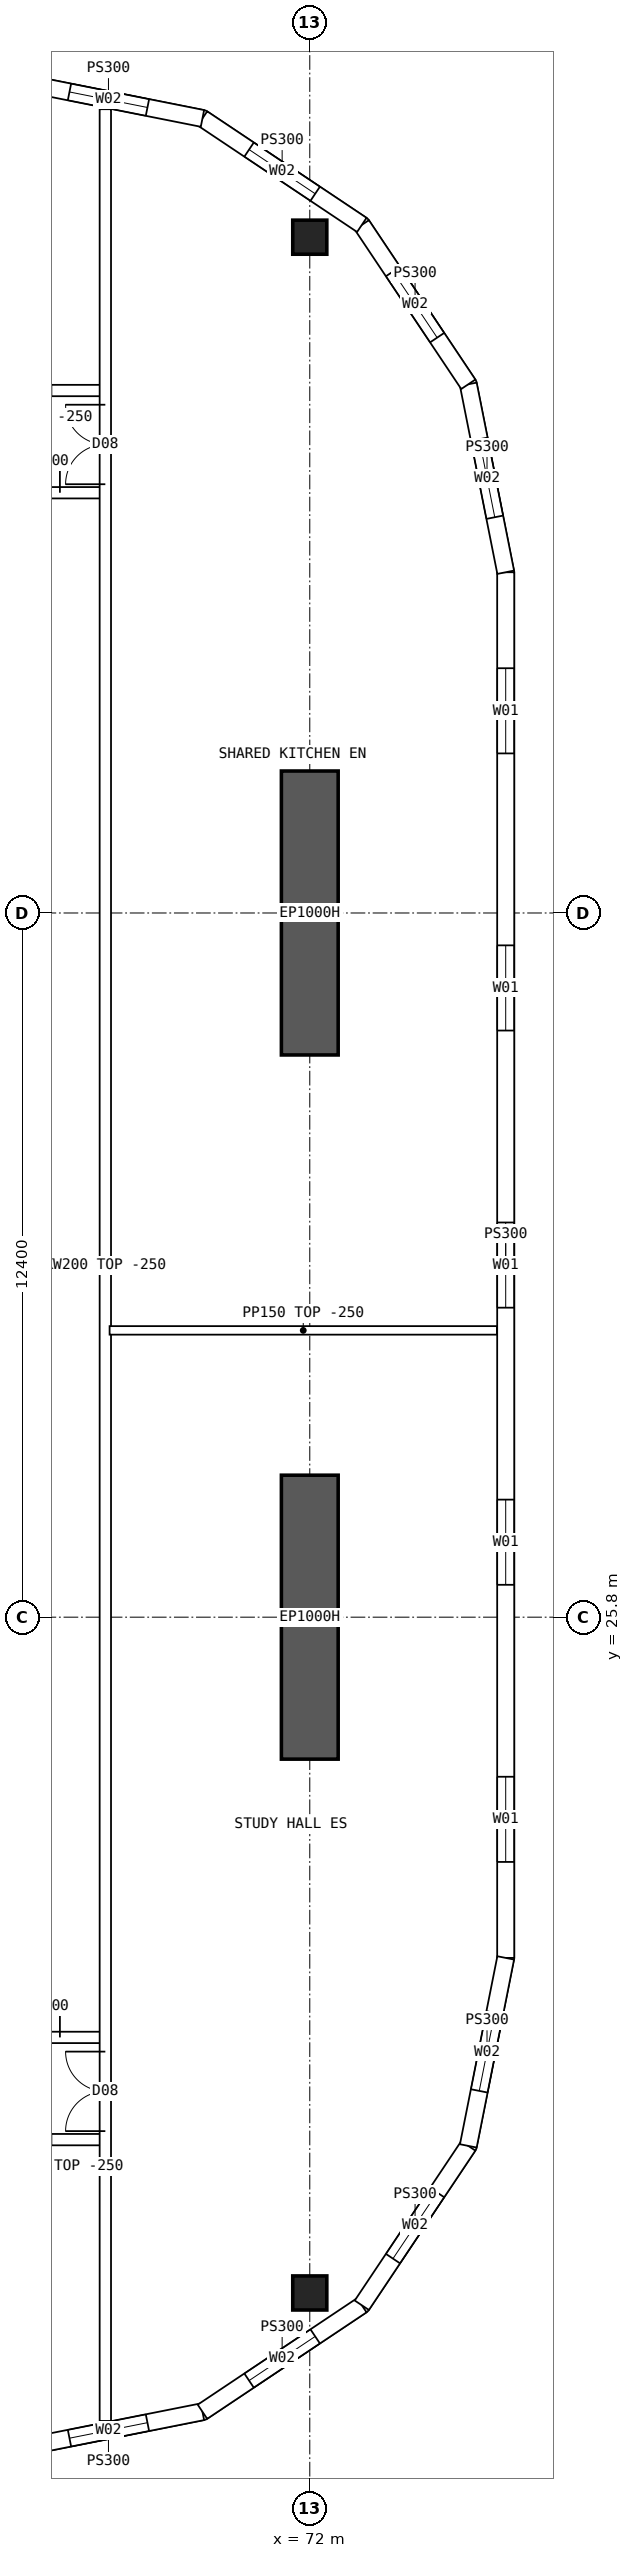
"""IFC4 building model, lengths in metres.
Left out: names, types, materials, properties, quantities, classifications, styles, units other than length and angle.
Written with IfcOpenShell. Run it as: python <this file> out.ifc"""

import sys

from ifc_helpers import new_model, si_unit, direction, frame, frame_2d, origin, origin_2d, place, context, subcontext, project, spatial, polyline, rectangle, hollow_rectangle, outline, extrude, element, fill, save


model = new_model("IFC4")
c1 = context("Model", 3, precision=1e-05, world=origin(), true_north=direction((0.0, 1.0)))
c2 = subcontext(c1, "Body", "Model", "MODEL_VIEW")
j1 = project(units=[si_unit("LENGTHUNIT", "METRE"), si_unit("PLANEANGLEUNIT", "RADIAN")], contexts=[c1])
p1 = place(None, origin())
s1 = spatial("IfcSite", under=j1, at=p1, CompositionType="ELEMENT")
p2 = place(p1, origin())
s2 = spatial("IfcBuilding", under=s1, at=p2, CompositionType="ELEMENT")
p3 = place(p2, frame((0.0, 0.0, 250.3)))
s3 = spatial("IfcBuildingStorey", under=s2, at=p3, CompositionType="ELEMENT", Elevation=250.3)
for number, where, z_axis, x_axis in (
    (1, (72.0, 13.9, 0.0), (0.0, 0.0, 1.0), (1.0, 0.0, 0.0)),
    (2, (72.0, 50.1, 0.0), (0.0, 0.0, 1.0), (1.0, 0.0, 0.0)),
):
    element("IfcColumn", number, at=place(p3, frame(where, z_axis=z_axis, x_axis=x_axis)), inside=s3, PredefinedType="COLUMN", context=c2, shape_type="SweptSolid", body=[
        extrude(hollow_rectangle(XDim=0.6, YDim=0.6, WallThickness=0.06, at=origin_2d()), origin(), (0.0, 0.0, 1.0), 3.75),
    ])
for number, where, z_axis, x_axis in (
    (3, (72.0, 23.3, 0.0), (0.0, 0.0, 1.0), (0.0, 1.0, 0.0)),
    (4, (72.0, 35.7, 0.0), (0.0, 0.0, 1.0), (0.0, 1.0, 0.0)),
):
    element("IfcWall", number, at=place(p3, frame(where, z_axis=z_axis, x_axis=x_axis)), inside=s3, PredefinedType="SHEAR", context=c2, shape_type="SweptSolid", body=[
        extrude(rectangle(XDim=5.0, YDim=1.0, at=frame_2d((2.5, 0.0))), origin(), (0.0, 0.0, 1.0), 3.75),
    ])
p4 = place(p3, frame((75.45, 19.8, 0.0), z_axis=(0.0, 0.0, 1.0), x_axis=(0.0, 1.0, 0.0)))
e5 = element("IfcWall", 5, at=p4, inside=s3, PredefinedType="SOLIDWALL", context=c2, shape_type="SweptSolid", body=[
    extrude(outline(polyline([(-0.015, -0.15), (24.415, -0.15), (24.385, 0.15), (0.015, 0.15), (-0.015, -0.15)])), origin(), (0.0, 0.0, 1.0), 3.5),
])
p5 = place(p4, frame((1.69, 0.0, 0.9)))
e6 = element("IfcOpeningElement", 6, at=p5, cuts=e5, PredefinedType="OPENING", context=c2, shape_type="SweptSolid", body=[
    extrude(rectangle(XDim=1.5, YDim=2.0, at=frame_2d((0.75, 1.0))), frame((0.0, 0.16, 0.0), z_axis=(0.0, -1.0, 0.0), x_axis=(1.0, 0.0, 0.0)), (0.0, 0.0, 1.0), 0.32),
])
p6 = place(p4, frame((6.57, 0.0, 0.9)))
e7 = element("IfcOpeningElement", 7, at=p6, cuts=e5, PredefinedType="OPENING", context=c2, shape_type="SweptSolid", body=[
    extrude(rectangle(XDim=1.5, YDim=2.0, at=frame_2d((0.75, 1.0))), frame((0.0, 0.16, 0.0), z_axis=(0.0, -1.0, 0.0), x_axis=(1.0, 0.0, 0.0)), (0.0, 0.0, 1.0), 0.32),
])
p7 = place(p4, frame((11.45, 0.0, 0.9)))
e8 = element("IfcOpeningElement", 8, at=p7, cuts=e5, PredefinedType="OPENING", context=c2, shape_type="SweptSolid", body=[
    extrude(rectangle(XDim=1.5, YDim=2.0, at=frame_2d((0.75, 1.0))), frame((0.0, 0.16, 0.0), z_axis=(0.0, -1.0, 0.0), x_axis=(1.0, 0.0, 0.0)), (0.0, 0.0, 1.0), 0.32),
])
p8 = place(p4, frame((16.33, 0.0, 0.9)))
e9 = element("IfcOpeningElement", 9, at=p8, cuts=e5, PredefinedType="OPENING", context=c2, shape_type="SweptSolid", body=[
    extrude(rectangle(XDim=1.5, YDim=2.0, at=frame_2d((0.75, 1.0))), frame((0.0, 0.16, 0.0), z_axis=(0.0, -1.0, 0.0), x_axis=(1.0, 0.0, 0.0)), (0.0, 0.0, 1.0), 0.32),
])
p9 = place(p4, frame((21.21, 0.0, 0.9)))
e10 = element("IfcOpeningElement", 10, at=p9, cuts=e5, PredefinedType="OPENING", context=c2, shape_type="SweptSolid", body=[
    extrude(rectangle(XDim=1.5, YDim=2.0, at=frame_2d((0.75, 1.0))), frame((0.0, 0.16, 0.0), z_axis=(0.0, -1.0, 0.0), x_axis=(1.0, 0.0, 0.0)), (0.0, 0.0, 1.0), 0.32),
])
p10 = place(p3, frame((66.8, 11.15, 0.0), z_axis=(0.0, 0.0, 1.0), x_axis=(0.98078325777, 0.195100490205, 0.0)))
e11 = element("IfcWall", 11, at=p10, inside=s3, PredefinedType="SOLIDWALL", context=c2, shape_type="SweptSolid", body=[
    extrude(outline(polyline([(-0.03, -0.15), (3.405, -0.15), (3.345, 0.15), (0.03, 0.15), (-0.03, -0.15)])), origin(), (0.0, 0.0, 1.0), 3.5),
])
p11 = place(p10, frame((0.988, 0.0, 0.9)))
e12 = element("IfcOpeningElement", 12, at=p11, cuts=e11, PredefinedType="OPENING", context=c2, shape_type="SweptSolid", body=[
    extrude(rectangle(XDim=1.4, YDim=1.8, at=frame_2d((0.7, 0.9))), frame((0.0, 0.16, 0.0), z_axis=(0.0, -1.0, 0.0), x_axis=(1.0, 0.0, 0.0)), (0.0, 0.0, 1.0), 0.32),
])
p12 = place(p3, frame((70.11, 11.808, 0.0), z_axis=(0.0, 0.0, 1.0), x_axis=(0.831460037396, 0.555584562613, 0.0)))
e13 = element("IfcWall", 13, at=p12, inside=s3, PredefinedType="SOLIDWALL", context=c2, shape_type="SweptSolid", body=[
    extrude(outline(polyline([(-0.03, -0.15), (3.405, -0.15), (3.345, 0.15), (0.03, 0.15), (-0.03, -0.15)])), origin(), (0.0, 0.0, 1.0), 3.5),
])
p13 = place(p12, frame((0.988, 0.0, 0.9)))
e14 = element("IfcOpeningElement", 14, at=p13, cuts=e13, PredefinedType="OPENING", context=c2, shape_type="SweptSolid", body=[
    extrude(rectangle(XDim=1.4, YDim=1.8, at=frame_2d((0.7, 0.9))), frame((0.0, 0.16, 0.0), z_axis=(0.0, -1.0, 0.0), x_axis=(1.0, 0.0, 0.0)), (0.0, 0.0, 1.0), 0.32),
])
p14 = place(p3, frame((72.917, 13.684, 0.0), z_axis=(0.0, 0.0, 1.0), x_axis=(0.555567969291, 0.831471124873, 0.0)))
e15 = element("IfcWall", 15, at=p14, inside=s3, PredefinedType="SOLIDWALL", context=c2, shape_type="SweptSolid", body=[
    extrude(outline(polyline([(-0.03, -0.15), (3.405, -0.15), (3.345, 0.15), (0.03, 0.15), (-0.03, -0.15)])), origin(), (0.0, 0.0, 1.0), 3.5),
])
p15 = place(p14, frame((0.988, 0.0, 0.9)))
e16 = element("IfcOpeningElement", 16, at=p15, cuts=e15, PredefinedType="OPENING", context=c2, shape_type="SweptSolid", body=[
    extrude(rectangle(XDim=1.4, YDim=1.8, at=frame_2d((0.7, 0.9))), frame((0.0, 0.16, 0.0), z_axis=(0.0, -1.0, 0.0), x_axis=(1.0, 0.0, 0.0)), (0.0, 0.0, 1.0), 0.32),
])
p16 = place(p3, frame((74.792, 16.49, 0.0), z_axis=(0.0, 0.0, 1.0), x_axis=(0.19508664885, 0.980786011034, 0.0)))
e17 = element("IfcWall", 17, at=p16, inside=s3, PredefinedType="SOLIDWALL", context=c2, shape_type="SweptSolid", body=[
    extrude(outline(polyline([(-0.03, -0.15), (3.39, -0.15), (3.36, 0.15), (0.03, 0.15), (-0.03, -0.15)])), origin(), (0.0, 0.0, 1.0), 3.5),
])
p17 = place(p16, frame((0.988, 0.0, 0.9)))
e18 = element("IfcOpeningElement", 18, at=p17, cuts=e17, PredefinedType="OPENING", context=c2, shape_type="SweptSolid", body=[
    extrude(rectangle(XDim=1.4, YDim=1.8, at=frame_2d((0.7, 0.9))), frame((0.0, 0.16, 0.0), z_axis=(0.0, -1.0, 0.0), x_axis=(1.0, 0.0, 0.0)), (0.0, 0.0, 1.0), 0.32),
])
p18 = place(p3, frame((75.45, 44.2, 0.0), z_axis=(0.0, 0.0, 1.0), x_axis=(-0.19508664885, 0.980786011034, 0.0)))
e19 = element("IfcWall", 19, at=p18, inside=s3, PredefinedType="SOLIDWALL", context=c2, shape_type="SweptSolid", body=[
    extrude(outline(polyline([(-0.015, -0.15), (3.405, -0.15), (3.345, 0.15), (0.015, 0.15), (-0.015, -0.15)])), origin(), (0.0, 0.0, 1.0), 3.5),
])
p19 = place(p18, frame((0.988, 0.0, 0.9)))
e20 = element("IfcOpeningElement", 20, at=p19, cuts=e19, PredefinedType="OPENING", context=c2, shape_type="SweptSolid", body=[
    extrude(rectangle(XDim=1.4, YDim=1.8, at=frame_2d((0.7, 0.9))), frame((0.0, 0.16, 0.0), z_axis=(0.0, -1.0, 0.0), x_axis=(1.0, 0.0, 0.0)), (0.0, 0.0, 1.0), 0.32),
])
p20 = place(p3, frame((74.792, 47.51, 0.0), z_axis=(0.0, 0.0, 1.0), x_axis=(-0.555567969291, 0.831471124873, 0.0)))
e21 = element("IfcWall", 21, at=p20, inside=s3, PredefinedType="SOLIDWALL", context=c2, shape_type="SweptSolid", body=[
    extrude(outline(polyline([(-0.03, -0.15), (3.405, -0.15), (3.345, 0.15), (0.03, 0.15), (-0.03, -0.15)])), origin(), (0.0, 0.0, 1.0), 3.5),
])
p21 = place(p20, frame((0.988, 0.0, 0.9)))
e22 = element("IfcOpeningElement", 22, at=p21, cuts=e21, PredefinedType="OPENING", context=c2, shape_type="SweptSolid", body=[
    extrude(rectangle(XDim=1.4, YDim=1.8, at=frame_2d((0.7, 0.9))), frame((0.0, 0.16, 0.0), z_axis=(0.0, -1.0, 0.0), x_axis=(1.0, 0.0, 0.0)), (0.0, 0.0, 1.0), 0.32),
])
p22 = place(p3, frame((72.917, 50.316, 0.0), z_axis=(0.0, 0.0, 1.0), x_axis=(-0.831460037396, 0.555584562613, 0.0)))
e23 = element("IfcWall", 23, at=p22, inside=s3, PredefinedType="SOLIDWALL", context=c2, shape_type="SweptSolid", body=[
    extrude(outline(polyline([(-0.03, -0.15), (3.405, -0.15), (3.345, 0.15), (0.03, 0.15), (-0.03, -0.15)])), origin(), (0.0, 0.0, 1.0), 3.5),
])
p23 = place(p22, frame((0.988, 0.0, 0.9)))
e24 = element("IfcOpeningElement", 24, at=p23, cuts=e23, PredefinedType="OPENING", context=c2, shape_type="SweptSolid", body=[
    extrude(rectangle(XDim=1.4, YDim=1.8, at=frame_2d((0.7, 0.9))), frame((0.0, 0.16, 0.0), z_axis=(0.0, -1.0, 0.0), x_axis=(1.0, 0.0, 0.0)), (0.0, 0.0, 1.0), 0.32),
])
p24 = place(p3, frame((70.11, 52.192, 0.0), z_axis=(0.0, 0.0, 1.0), x_axis=(-0.98078325777, 0.195100490205, 0.0)))
e25 = element("IfcWall", 25, at=p24, inside=s3, PredefinedType="SOLIDWALL", context=c2, shape_type="SweptSolid", body=[
    extrude(outline(polyline([(-0.03, -0.15), (3.405, -0.15), (3.345, 0.15), (0.03, 0.15), (-0.03, -0.15)])), origin(), (0.0, 0.0, 1.0), 3.5),
])
p25 = place(p24, frame((0.988, 0.0, 0.9)))
e26 = element("IfcOpeningElement", 26, at=p25, cuts=e25, PredefinedType="OPENING", context=c2, shape_type="SweptSolid", body=[
    extrude(rectangle(XDim=1.4, YDim=1.8, at=frame_2d((0.7, 0.9))), frame((0.0, 0.16, 0.0), z_axis=(0.0, -1.0, 0.0), x_axis=(1.0, 0.0, 0.0)), (0.0, 0.0, 1.0), 0.32),
])
p26 = place(p3, frame((66.35, 16.6, 0.0), z_axis=(0.0, 0.0, 1.0), x_axis=(1.0, 0.0, 0.0)))
e27 = element("IfcWall", 27, at=p26, inside=s3, PredefinedType="SOLIDWALL", context=c2, shape_type="SweptSolid", body=[
    extrude(rectangle(XDim=2.05, YDim=0.2, at=frame_2d((1.025, 0.0))), origin(), (0.0, 0.0, 1.0), 3.5),
])
p27 = place(p26, frame((0.2, 0.0, 0.0)))
e28 = element("IfcOpeningElement", 28, at=p27, cuts=e27, PredefinedType="OPENING", context=c2, shape_type="SweptSolid", body=[
    extrude(rectangle(XDim=0.9, YDim=2.1, at=frame_2d((0.45, 1.05))), frame((0.0, 0.11, 0.0), z_axis=(0.0, -1.0, 0.0), x_axis=(1.0, 0.0, 0.0)), (0.0, 0.0, 1.0), 0.22),
])
p28 = place(p3, frame((66.35, 18.4, 0.0), z_axis=(0.0, 0.0, 1.0), x_axis=(1.0, 0.0, 0.0)))
e29 = element("IfcWall", 29, at=p28, inside=s3, PredefinedType="SOLIDWALL", context=c2, shape_type="SweptSolid", body=[
    extrude(rectangle(XDim=2.05, YDim=0.2, at=frame_2d((1.025, 0.0))), origin(), (0.0, 0.0, 1.0), 3.5),
])
p29 = place(p28, frame((0.05, 0.0, 0.0)))
e30 = element("IfcOpeningElement", 30, at=p29, cuts=e29, PredefinedType="OPENING", context=c2, shape_type="SweptSolid", body=[
    extrude(rectangle(XDim=1.2, YDim=2.1, at=frame_2d((0.6, 1.05))), frame((0.0, 0.11, 0.0), z_axis=(0.0, -1.0, 0.0), x_axis=(1.0, 0.0, 0.0)), (0.0, 0.0, 1.0), 0.22),
])
p30 = place(p3, frame((66.35, 47.4, 0.0), z_axis=(0.0, 0.0, 1.0), x_axis=(1.0, 0.0, 0.0)))
e31 = element("IfcWall", 31, at=p30, inside=s3, PredefinedType="SOLIDWALL", context=c2, shape_type="SweptSolid", body=[
    extrude(rectangle(XDim=2.05, YDim=0.2, at=frame_2d((1.025, 0.0))), origin(), (0.0, 0.0, 1.0), 3.5),
])
p31 = place(p30, frame((0.2, 0.0, 0.0)))
e32 = element("IfcOpeningElement", 32, at=p31, cuts=e31, PredefinedType="OPENING", context=c2, shape_type="SweptSolid", body=[
    extrude(rectangle(XDim=0.9, YDim=2.1, at=frame_2d((0.45, 1.05))), frame((0.0, 0.11, 0.0), z_axis=(0.0, -1.0, 0.0), x_axis=(1.0, 0.0, 0.0)), (0.0, 0.0, 1.0), 0.22),
])
p32 = place(p3, frame((66.35, 45.6, 0.0), z_axis=(0.0, 0.0, 1.0), x_axis=(1.0, 0.0, 0.0)))
e33 = element("IfcWall", 33, at=p32, inside=s3, PredefinedType="SOLIDWALL", context=c2, shape_type="SweptSolid", body=[
    extrude(rectangle(XDim=2.05, YDim=0.2, at=frame_2d((1.025, 0.0))), origin(), (0.0, 0.0, 1.0), 3.5),
])
p33 = place(p32, frame((0.05, 0.0, 0.0)))
e34 = element("IfcOpeningElement", 34, at=p33, cuts=e33, PredefinedType="OPENING", context=c2, shape_type="SweptSolid", body=[
    extrude(rectangle(XDim=1.2, YDim=2.1, at=frame_2d((0.6, 1.05))), frame((0.0, 0.11, 0.0), z_axis=(0.0, -1.0, 0.0), x_axis=(1.0, 0.0, 0.0)), (0.0, 0.0, 1.0), 0.22),
])
p34 = place(p3, frame((68.475, 30.85, 0.0), z_axis=(0.0, 0.0, 1.0), x_axis=(1.0, 0.0, 0.0)))
e35 = element("IfcWall", 35, at=p34, inside=s3, PredefinedType="PARTITIONING", context=c2, shape_type="SweptSolid", body=[
    extrude(outline(polyline([(0.0, 0.0), (6.82, 0.0), (6.82, 3.5), (3.827, 3.5), (3.825, 3.05), (3.227, 3.05), (3.225, 3.5), (0.0, 3.5), (0.0, 0.0)])), frame((0.0, 0.075, 0.0), z_axis=(0.0, -1.0, 0.0), x_axis=(1.0, 0.0, 0.0)), (0.0, 0.0, 1.0), 0.15),
])
p35 = place(p3, frame((68.4, 11.646, 0.0), z_axis=(0.0, 0.0, 1.0), x_axis=(0.0, 1.0, 0.0)))
e36 = element("IfcWall", 36, at=p35, inside=s3, PredefinedType="SOLIDWALL", context=c2, shape_type="SweptSolid", body=[
    extrude(rectangle(XDim=40.708, YDim=0.2, at=frame_2d((20.354, 0.0))), origin(), (0.0, 0.0, 1.0), 3.5),
])
p36 = place(p35, frame((5.104, 0.0, 0.0)))
e37 = element("IfcOpeningElement", 37, at=p36, cuts=e36, PredefinedType="OPENING", context=c2, shape_type="SweptSolid", body=[
    extrude(rectangle(XDim=1.4, YDim=2.1, at=frame_2d((0.7, 1.05))), frame((0.0, 0.11, 0.0), z_axis=(0.0, -1.0, 0.0), x_axis=(1.0, 0.0, 0.0)), (0.0, 0.0, 1.0), 0.22),
])
p37 = place(p35, frame((34.104, 0.0, 0.0)))
e38 = element("IfcOpeningElement", 38, at=p37, cuts=e36, PredefinedType="OPENING", context=c2, shape_type="SweptSolid", body=[
    extrude(rectangle(XDim=1.4, YDim=2.1, at=frame_2d((0.7, 1.05))), frame((0.0, 0.11, 0.0), z_axis=(0.0, -1.0, 0.0), x_axis=(1.0, 0.0, 0.0)), (0.0, 0.0, 1.0), 0.22),
])
p38 = place(p5, origin())
e39 = element("IfcWindow", 39, at=p38, inside=s3, PartitioningType="SINGLE_PANEL", PredefinedType="WINDOW", context=c2, shape_type="SweptSolid", body=[
    extrude(rectangle(XDim=1.5, YDim=2.0, at=frame_2d((0.75, 1.0))), frame((0.0, 0.03, 0.0), z_axis=(0.0, -1.0, 0.0), x_axis=(1.0, 0.0, 0.0)), (0.0, 0.0, 1.0), 0.06),
])
fill(e6, e39)
p39 = place(p6, origin())
e40 = element("IfcWindow", 40, at=p39, inside=s3, PartitioningType="SINGLE_PANEL", PredefinedType="WINDOW", context=c2, shape_type="SweptSolid", body=[
    extrude(rectangle(XDim=1.5, YDim=2.0, at=frame_2d((0.75, 1.0))), frame((0.0, 0.03, 0.0), z_axis=(0.0, -1.0, 0.0), x_axis=(1.0, 0.0, 0.0)), (0.0, 0.0, 1.0), 0.06),
])
fill(e7, e40)
p40 = place(p7, origin())
e41 = element("IfcWindow", 41, at=p40, inside=s3, PartitioningType="SINGLE_PANEL", PredefinedType="WINDOW", context=c2, shape_type="SweptSolid", body=[
    extrude(rectangle(XDim=1.5, YDim=2.0, at=frame_2d((0.75, 1.0))), frame((0.0, 0.03, 0.0), z_axis=(0.0, -1.0, 0.0), x_axis=(1.0, 0.0, 0.0)), (0.0, 0.0, 1.0), 0.06),
])
fill(e8, e41)
p41 = place(p8, origin())
e42 = element("IfcWindow", 42, at=p41, inside=s3, PartitioningType="SINGLE_PANEL", PredefinedType="WINDOW", context=c2, shape_type="SweptSolid", body=[
    extrude(rectangle(XDim=1.5, YDim=2.0, at=frame_2d((0.75, 1.0))), frame((0.0, 0.03, 0.0), z_axis=(0.0, -1.0, 0.0), x_axis=(1.0, 0.0, 0.0)), (0.0, 0.0, 1.0), 0.06),
])
fill(e9, e42)
p42 = place(p9, origin())
e43 = element("IfcWindow", 43, at=p42, inside=s3, PartitioningType="SINGLE_PANEL", PredefinedType="WINDOW", context=c2, shape_type="SweptSolid", body=[
    extrude(rectangle(XDim=1.5, YDim=2.0, at=frame_2d((0.75, 1.0))), frame((0.0, 0.03, 0.0), z_axis=(0.0, -1.0, 0.0), x_axis=(1.0, 0.0, 0.0)), (0.0, 0.0, 1.0), 0.06),
])
fill(e10, e43)
p43 = place(p11, origin())
e44 = element("IfcWindow", 44, at=p43, inside=s3, PartitioningType="SINGLE_PANEL", PredefinedType="WINDOW", context=c2, shape_type="SweptSolid", body=[
    extrude(rectangle(XDim=1.4, YDim=1.8, at=frame_2d((0.7, 0.9))), frame((0.0, 0.03, 0.0), z_axis=(0.0, -1.0, 0.0), x_axis=(1.0, 0.0, 0.0)), (0.0, 0.0, 1.0), 0.06),
])
fill(e12, e44)
p44 = place(p13, origin())
e45 = element("IfcWindow", 45, at=p44, inside=s3, PartitioningType="SINGLE_PANEL", PredefinedType="WINDOW", context=c2, shape_type="SweptSolid", body=[
    extrude(rectangle(XDim=1.4, YDim=1.8, at=frame_2d((0.7, 0.9))), frame((0.0, 0.03, 0.0), z_axis=(0.0, -1.0, 0.0), x_axis=(1.0, 0.0, 0.0)), (0.0, 0.0, 1.0), 0.06),
])
fill(e14, e45)
p45 = place(p15, origin())
e46 = element("IfcWindow", 46, at=p45, inside=s3, PartitioningType="SINGLE_PANEL", PredefinedType="WINDOW", context=c2, shape_type="SweptSolid", body=[
    extrude(rectangle(XDim=1.4, YDim=1.8, at=frame_2d((0.7, 0.9))), frame((0.0, 0.03, 0.0), z_axis=(0.0, -1.0, 0.0), x_axis=(1.0, 0.0, 0.0)), (0.0, 0.0, 1.0), 0.06),
])
fill(e16, e46)
p46 = place(p17, origin())
e47 = element("IfcWindow", 47, at=p46, inside=s3, PartitioningType="SINGLE_PANEL", PredefinedType="WINDOW", context=c2, shape_type="SweptSolid", body=[
    extrude(rectangle(XDim=1.4, YDim=1.8, at=frame_2d((0.7, 0.9))), frame((0.0, 0.03, 0.0), z_axis=(0.0, -1.0, 0.0), x_axis=(1.0, 0.0, 0.0)), (0.0, 0.0, 1.0), 0.06),
])
fill(e18, e47)
p47 = place(p19, origin())
e48 = element("IfcWindow", 48, at=p47, inside=s3, PartitioningType="SINGLE_PANEL", PredefinedType="WINDOW", context=c2, shape_type="SweptSolid", body=[
    extrude(rectangle(XDim=1.4, YDim=1.8, at=frame_2d((0.7, 0.9))), frame((0.0, 0.03, 0.0), z_axis=(0.0, -1.0, 0.0), x_axis=(1.0, 0.0, 0.0)), (0.0, 0.0, 1.0), 0.06),
])
fill(e20, e48)
p48 = place(p21, origin())
e49 = element("IfcWindow", 49, at=p48, inside=s3, PartitioningType="SINGLE_PANEL", PredefinedType="WINDOW", context=c2, shape_type="SweptSolid", body=[
    extrude(rectangle(XDim=1.4, YDim=1.8, at=frame_2d((0.7, 0.9))), frame((0.0, 0.03, 0.0), z_axis=(0.0, -1.0, 0.0), x_axis=(1.0, 0.0, 0.0)), (0.0, 0.0, 1.0), 0.06),
])
fill(e22, e49)
p49 = place(p23, origin())
e50 = element("IfcWindow", 50, at=p49, inside=s3, PartitioningType="SINGLE_PANEL", PredefinedType="WINDOW", context=c2, shape_type="SweptSolid", body=[
    extrude(rectangle(XDim=1.4, YDim=1.8, at=frame_2d((0.7, 0.9))), frame((0.0, 0.03, 0.0), z_axis=(0.0, -1.0, 0.0), x_axis=(1.0, 0.0, 0.0)), (0.0, 0.0, 1.0), 0.06),
])
fill(e24, e50)
p50 = place(p25, origin())
e51 = element("IfcWindow", 51, at=p50, inside=s3, PartitioningType="SINGLE_PANEL", PredefinedType="WINDOW", context=c2, shape_type="SweptSolid", body=[
    extrude(rectangle(XDim=1.4, YDim=1.8, at=frame_2d((0.7, 0.9))), frame((0.0, 0.03, 0.0), z_axis=(0.0, -1.0, 0.0), x_axis=(1.0, 0.0, 0.0)), (0.0, 0.0, 1.0), 0.06),
])
fill(e26, e51)
p51 = place(p29, origin())
e52 = element("IfcDoor", 52, at=p51, inside=s3, OperationType="DOUBLE_DOOR_SINGLE_SWING", PredefinedType="DOOR", context=c2, shape_type="SweptSolid", body=[
    extrude(rectangle(XDim=1.2, YDim=2.1, at=frame_2d((0.6, 1.05))), frame((0.0, 0.025, 0.0), z_axis=(0.0, -1.0, 0.0), x_axis=(1.0, 0.0, 0.0)), (0.0, 0.0, 1.0), 0.05),
])
fill(e30, e52)
p52 = place(p33, origin())
e53 = element("IfcDoor", 53, at=p52, inside=s3, OperationType="DOUBLE_DOOR_SINGLE_SWING", PredefinedType="DOOR", context=c2, shape_type="SweptSolid", body=[
    extrude(rectangle(XDim=1.2, YDim=2.1, at=frame_2d((0.6, 1.05))), frame((0.0, 0.025, 0.0), z_axis=(0.0, -1.0, 0.0), x_axis=(1.0, 0.0, 0.0)), (0.0, 0.0, 1.0), 0.05),
])
fill(e34, e53)
p53 = place(p36, origin())
e54 = element("IfcDoor", 54, at=p53, inside=s3, OperationType="DOUBLE_DOOR_SINGLE_SWING", PredefinedType="DOOR", context=c2, shape_type="SweptSolid", body=[
    extrude(rectangle(XDim=1.4, YDim=2.1, at=frame_2d((0.7, 1.05))), frame((0.0, 0.025, 0.0), z_axis=(0.0, -1.0, 0.0), x_axis=(1.0, 0.0, 0.0)), (0.0, 0.0, 1.0), 0.05),
])
fill(e37, e54)
p54 = place(p37, origin())
e55 = element("IfcDoor", 55, at=p54, inside=s3, OperationType="DOUBLE_DOOR_SINGLE_SWING", PredefinedType="DOOR", context=c2, shape_type="SweptSolid", body=[
    extrude(rectangle(XDim=1.4, YDim=2.1, at=frame_2d((0.7, 1.05))), frame((0.0, 0.025, 0.0), z_axis=(0.0, -1.0, 0.0), x_axis=(1.0, 0.0, 0.0)), (0.0, 0.0, 1.0), 0.05),
])
fill(e38, e55)
save(model, sys.argv[1])
